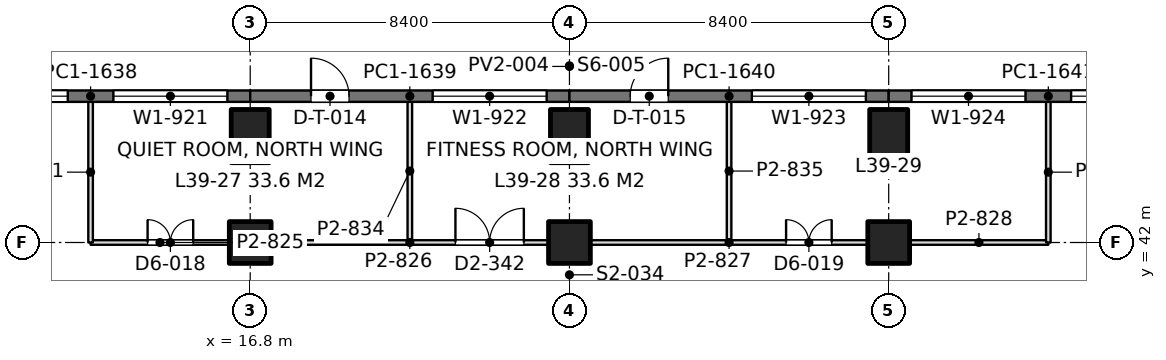
"""IFC4 building model, lengths in metres.
Left out: names, types, materials, properties, quantities, classifications, styles, units other than length and angle.
Written with IfcOpenShell. Run it as: python <this file> out.ifc"""

import sys

from ifc_helpers import new_model, si_unit, direction, frame, frame_2d, origin, origin_2d, place, context, subcontext, project, spatial, rectangle, extrude, element, fill, save


model = new_model("IFC4")
c1 = context("Model", 3, precision=1e-05, world=origin(), true_north=direction((0.0, 1.0)))
c2 = subcontext(c1, "Body", "Model", "MODEL_VIEW")
j1 = project(units=[si_unit("LENGTHUNIT", "METRE"), si_unit("PLANEANGLEUNIT", "RADIAN")], contexts=[c1])
p1 = place(None, origin())
s1 = spatial("IfcSite", under=j1, at=p1, CompositionType="ELEMENT")
p2 = place(p1, origin())
s2 = spatial("IfcBuilding", under=s1, at=p2, CompositionType="ELEMENT")
p3 = place(p2, frame((0.0, 0.0, 173.4)))
s3 = spatial("IfcBuildingStorey", under=s2, at=p3, CompositionType="ELEMENT", Elevation=173.4)
p4 = place(p3, frame((16.8, 42.0, 0.0), z_axis=(0.0, 0.0, 1.0), x_axis=(1.0, 0.0, 0.0)))
e1 = element("IfcColumn", 1, at=p4, inside=s3, PredefinedType="COLUMN", context=c2, shape_type="SweptSolid", body=[
    extrude(rectangle(XDim=1.1, YDim=1.1, at=origin_2d()), origin(), (0.0, 0.0, 1.0), 4.2),
])
p5 = place(p3, frame((16.8, 44.8, -0.36), z_axis=(0.0, 0.0, 1.0), x_axis=(1.0, 0.0, 0.0)))
e2 = element("IfcColumn", 2, at=p5, inside=s3, PredefinedType="COLUMN", context=c2, shape_type="SweptSolid", body=[
    extrude(rectangle(XDim=1.0, YDim=1.4, at=origin_2d()), origin(), (0.0, 0.0, 1.0), 4.56),
])
p6 = place(p3, frame((25.2, 42.0, 0.0), z_axis=(0.0, 0.0, 1.0), x_axis=(1.0, 0.0, 0.0)))
e3 = element("IfcColumn", 3, at=p6, inside=s3, PredefinedType="COLUMN", context=c2, shape_type="SweptSolid", body=[
    extrude(rectangle(XDim=1.1, YDim=1.1, at=origin_2d()), origin(), (0.0, 0.0, 1.0), 4.2),
])
p7 = place(p3, frame((25.2, 44.8, -0.36), z_axis=(0.0, 0.0, 1.0), x_axis=(1.0, 0.0, 0.0)))
e4 = element("IfcColumn", 4, at=p7, inside=s3, PredefinedType="COLUMN", context=c2, shape_type="SweptSolid", body=[
    extrude(rectangle(XDim=1.0, YDim=1.4, at=origin_2d()), origin(), (0.0, 0.0, 1.0), 4.56),
])
p8 = place(p3, frame((33.6, 42.0, 0.0), z_axis=(0.0, 0.0, 1.0), x_axis=(1.0, 0.0, 0.0)))
e5 = element("IfcColumn", 5, at=p8, inside=s3, PredefinedType="COLUMN", context=c2, shape_type="SweptSolid", body=[
    extrude(rectangle(XDim=1.1, YDim=1.1, at=origin_2d()), origin(), (0.0, 0.0, 1.0), 4.2),
])
p9 = place(p3, frame((33.6, 44.8, -0.36), z_axis=(0.0, 0.0, 1.0), x_axis=(1.0, 0.0, 0.0)))
e6 = element("IfcColumn", 6, at=p9, inside=s3, PredefinedType="COLUMN", context=c2, shape_type="SweptSolid", body=[
    extrude(rectangle(XDim=1.0, YDim=1.4, at=origin_2d()), origin(), (0.0, 0.0, 1.0), 4.56),
])
p10 = place(p3, frame((8.4, 45.85, 0.0), z_axis=(0.0, 0.0, 1.0), x_axis=(1.0, 0.0, 0.0)))
e7 = element("IfcWall", 7, at=p10, inside=s3, PredefinedType="SOLIDWALL", context=c2, shape_type="SweptSolid", body=[
    extrude(rectangle(XDim=8.4, YDim=0.3, at=frame_2d((4.2, 0.0))), origin(), (0.0, 0.0, 1.0), 4.05),
])
p11 = place(p10, frame((0.6, 0.0, 0.9)))
e8 = element("IfcOpeningElement", 8, at=p11, cuts=e7, PredefinedType="OPENING", context=c2, shape_type="SweptSolid", body=[
    extrude(rectangle(XDim=3.0, YDim=1.9, at=frame_2d((1.5, 0.95))), frame((0.0, 0.16, 0.0), z_axis=(0.0, -1.0, 0.0), x_axis=(1.0, 0.0, 0.0)), (0.0, 0.0, 1.0), 0.32),
])
p12 = place(p10, frame((4.8, 0.0, 0.9)))
e9 = element("IfcOpeningElement", 9, at=p12, cuts=e7, PredefinedType="OPENING", context=c2, shape_type="SweptSolid", body=[
    extrude(rectangle(XDim=3.0, YDim=1.9, at=frame_2d((1.5, 0.95))), frame((0.0, 0.16, 0.0), z_axis=(0.0, -1.0, 0.0), x_axis=(1.0, 0.0, 0.0)), (0.0, 0.0, 1.0), 0.32),
])
p13 = place(p3, frame((16.8, 45.85, 0.0), z_axis=(0.0, 0.0, 1.0), x_axis=(1.0, 0.0, 0.0)))
e10 = element("IfcWall", 10, at=p13, inside=s3, PredefinedType="SOLIDWALL", context=c2, shape_type="SweptSolid", body=[
    extrude(rectangle(XDim=8.4, YDim=0.3, at=frame_2d((4.2, 0.0))), origin(), (0.0, 0.0, 1.0), 4.05),
])
p14 = place(p13, frame((4.8, 0.0, 0.9)))
e11 = element("IfcOpeningElement", 11, at=p14, cuts=e10, PredefinedType="OPENING", context=c2, shape_type="SweptSolid", body=[
    extrude(rectangle(XDim=3.0, YDim=1.9, at=frame_2d((1.5, 0.95))), frame((0.0, 0.16, 0.0), z_axis=(0.0, -1.0, 0.0), x_axis=(1.0, 0.0, 0.0)), (0.0, 0.0, 1.0), 0.32),
])
p15 = place(p13, frame((1.6, 0.0, 0.0)))
e12 = element("IfcOpeningElement", 12, at=p15, cuts=e10, PredefinedType="OPENING", context=c2, shape_type="SweptSolid", body=[
    extrude(rectangle(XDim=1.0, YDim=2.4, at=frame_2d((0.5, 1.2))), frame((0.0, 0.16, 0.0), z_axis=(0.0, -1.0, 0.0), x_axis=(1.0, 0.0, 0.0)), (0.0, 0.0, 1.0), 0.32),
])
p16 = place(p3, frame((25.2, 45.85, 0.0), z_axis=(0.0, 0.0, 1.0), x_axis=(1.0, 0.0, 0.0)))
e13 = element("IfcWall", 13, at=p16, inside=s3, PredefinedType="SOLIDWALL", context=c2, shape_type="SweptSolid", body=[
    extrude(rectangle(XDim=8.4, YDim=0.3, at=frame_2d((4.2, 0.0))), origin(), (0.0, 0.0, 1.0), 4.05),
])
p17 = place(p16, frame((4.8, 0.0, 0.9)))
e14 = element("IfcOpeningElement", 14, at=p17, cuts=e13, PredefinedType="OPENING", context=c2, shape_type="SweptSolid", body=[
    extrude(rectangle(XDim=3.0, YDim=1.9, at=frame_2d((1.5, 0.95))), frame((0.0, 0.16, 0.0), z_axis=(0.0, -1.0, 0.0), x_axis=(1.0, 0.0, 0.0)), (0.0, 0.0, 1.0), 0.32),
])
p18 = place(p16, frame((1.6, 0.0, 0.0)))
e15 = element("IfcOpeningElement", 15, at=p18, cuts=e13, PredefinedType="OPENING", context=c2, shape_type="SweptSolid", body=[
    extrude(rectangle(XDim=1.0, YDim=2.4, at=frame_2d((0.5, 1.2))), frame((0.0, 0.16, 0.0), z_axis=(0.0, -1.0, 0.0), x_axis=(1.0, 0.0, 0.0)), (0.0, 0.0, 1.0), 0.32),
])
p19 = place(p3, frame((33.6, 45.85, 0.0), z_axis=(0.0, 0.0, 1.0), x_axis=(1.0, 0.0, 0.0)))
e16 = element("IfcWall", 16, at=p19, inside=s3, PredefinedType="SOLIDWALL", context=c2, shape_type="SweptSolid", body=[
    extrude(rectangle(XDim=8.4, YDim=0.3, at=frame_2d((4.2, 0.0))), origin(), (0.0, 0.0, 1.0), 4.05),
])
p20 = place(p19, frame((0.6, 0.0, 0.9)))
e17 = element("IfcOpeningElement", 17, at=p20, cuts=e16, PredefinedType="OPENING", context=c2, shape_type="SweptSolid", body=[
    extrude(rectangle(XDim=3.0, YDim=1.9, at=frame_2d((1.5, 0.95))), frame((0.0, 0.16, 0.0), z_axis=(0.0, -1.0, 0.0), x_axis=(1.0, 0.0, 0.0)), (0.0, 0.0, 1.0), 0.32),
])
p21 = place(p19, frame((4.8, 0.0, 0.9)))
e18 = element("IfcOpeningElement", 18, at=p21, cuts=e16, PredefinedType="OPENING", context=c2, shape_type="SweptSolid", body=[
    extrude(rectangle(XDim=3.0, YDim=1.9, at=frame_2d((1.5, 0.95))), frame((0.0, 0.16, 0.0), z_axis=(0.0, -1.0, 0.0), x_axis=(1.0, 0.0, 0.0)), (0.0, 0.0, 1.0), 0.32),
])
p22 = place(p3, frame((12.6, 42.0, 0.0), z_axis=(0.0, 0.0, 1.0), x_axis=(1.0, 0.0, 0.0)))
e19 = element("IfcWall", 19, at=p22, inside=s3, PredefinedType="PARTITIONING", context=c2, shape_type="SweptSolid", body=[
    extrude(rectangle(XDim=3.651, YDim=0.12, at=frame_2d((1.825, 0.0))), origin(), (0.0, 0.0, 1.0), 3.55),
])
p23 = place(p22, frame((1.5, 0.0, 0.0)))
e20 = element("IfcOpeningElement", 20, at=p23, cuts=e19, PredefinedType="OPENING", context=c2, shape_type="SweptSolid", body=[
    extrude(rectangle(XDim=1.2, YDim=2.2, at=frame_2d((0.6, 1.1))), frame((0.0, 0.07, 0.0), z_axis=(0.0, -1.0, 0.0), x_axis=(1.0, 0.0, 0.0)), (0.0, 0.0, 1.0), 0.14),
])
p24 = place(p3, frame((17.349, 42.0, 0.0), z_axis=(0.0, 0.0, 1.0), x_axis=(1.0, 0.0, 0.0)))
e21 = element("IfcWall", 21, at=p24, inside=s3, PredefinedType="PARTITIONING", context=c2, shape_type="SweptSolid", body=[
    extrude(rectangle(XDim=7.302, YDim=0.12, at=frame_2d((3.651, 0.0))), origin(), (0.0, 0.0, 1.0), 3.55),
])
p25 = place(p24, frame((4.851, 0.0, 0.0)))
e22 = element("IfcOpeningElement", 22, at=p25, cuts=e21, PredefinedType="OPENING", context=c2, shape_type="SweptSolid", body=[
    extrude(rectangle(XDim=1.8, YDim=2.2, at=frame_2d((0.9, 1.1))), frame((0.0, 0.07, 0.0), z_axis=(0.0, -1.0, 0.0), x_axis=(1.0, 0.0, 0.0)), (0.0, 0.0, 1.0), 0.14),
])
p26 = place(p3, frame((25.749, 42.0, 0.0), z_axis=(0.0, 0.0, 1.0), x_axis=(1.0, 0.0, 0.0)))
e23 = element("IfcWall", 23, at=p26, inside=s3, PredefinedType="PARTITIONING", context=c2, shape_type="SweptSolid", body=[
    extrude(rectangle(XDim=7.302, YDim=0.12, at=frame_2d((3.651, 0.0))), origin(), (0.0, 0.0, 1.0), 3.55),
])
p27 = place(p26, frame((5.151, 0.0, 0.0)))
e24 = element("IfcOpeningElement", 24, at=p27, cuts=e23, PredefinedType="OPENING", context=c2, shape_type="SweptSolid", body=[
    extrude(rectangle(XDim=1.2, YDim=2.2, at=frame_2d((0.6, 1.1))), frame((0.0, 0.07, 0.0), z_axis=(0.0, -1.0, 0.0), x_axis=(1.0, 0.0, 0.0)), (0.0, 0.0, 1.0), 0.14),
])
p28 = place(p3, frame((34.149, 42.0, 0.0), z_axis=(0.0, 0.0, 1.0), x_axis=(1.0, 0.0, 0.0)))
e25 = element("IfcWall", 25, at=p28, inside=s3, PredefinedType="PARTITIONING", context=c2, shape_type="SweptSolid", body=[
    extrude(rectangle(XDim=3.651, YDim=0.12, at=frame_2d((1.826, 0.0))), origin(), (0.0, 0.0, 1.0), 3.55),
])
p29 = place(p3, frame((12.6, 42.0, 0.0), z_axis=(0.0, 0.0, 1.0), x_axis=(0.0, 1.0, 0.0)))
e26 = element("IfcWall", 26, at=p29, inside=s3, PredefinedType="PARTITIONING", context=c2, shape_type="SweptSolid", body=[
    extrude(rectangle(XDim=3.702, YDim=0.12, at=frame_2d((1.851, 0.0))), origin(), (0.0, 0.0, 1.0), 3.55),
])
for number, where, z_axis, x_axis in (
    (27, (21.0, 42.058, 0.0), (0.0, 0.0, 1.0), (0.0, 1.0, 0.0)),
    (28, (29.4, 42.058, 0.0), (0.0, 0.0, 1.0), (0.0, 1.0, 0.0)),
):
    element("IfcWall", number, at=place(p3, frame(where, z_axis=z_axis, x_axis=x_axis)), inside=s3, PredefinedType="PARTITIONING", context=c2, shape_type="SweptSolid", body=[
        extrude(rectangle(XDim=3.644, YDim=0.12, at=frame_2d((1.822, 0.0))), origin(), (0.0, 0.0, 1.0), 3.55),
    ])
p30 = place(p3, frame((37.8, 42.0, 0.0), z_axis=(0.0, 0.0, 1.0), x_axis=(0.0, 1.0, 0.0)))
e29 = element("IfcWall", 29, at=p30, inside=s3, PredefinedType="PARTITIONING", context=c2, shape_type="SweptSolid", body=[
    extrude(rectangle(XDim=3.702, YDim=0.12, at=frame_2d((1.851, 0.0))), origin(), (0.0, 0.0, 1.0), 3.55),
])
p31 = place(p11, origin())
e30 = element("IfcWindow", 30, at=p31, inside=s3, PartitioningType="SINGLE_PANEL", PredefinedType="WINDOW", context=c2, shape_type="SweptSolid", body=[
    extrude(rectangle(XDim=3.0, YDim=1.9, at=frame_2d((1.5, 0.95))), frame((0.0, 0.03, 0.0), z_axis=(0.0, -1.0, 0.0), x_axis=(1.0, 0.0, 0.0)), (0.0, 0.0, 1.0), 0.06),
])
fill(e8, e30)
p32 = place(p12, origin())
e31 = element("IfcWindow", 31, at=p32, inside=s3, PartitioningType="SINGLE_PANEL", PredefinedType="WINDOW", context=c2, shape_type="SweptSolid", body=[
    extrude(rectangle(XDim=3.0, YDim=1.9, at=frame_2d((1.5, 0.95))), frame((0.0, 0.03, 0.0), z_axis=(0.0, -1.0, 0.0), x_axis=(1.0, 0.0, 0.0)), (0.0, 0.0, 1.0), 0.06),
])
fill(e9, e31)
p33 = place(p14, origin())
e32 = element("IfcWindow", 32, at=p33, inside=s3, PartitioningType="SINGLE_PANEL", PredefinedType="WINDOW", context=c2, shape_type="SweptSolid", body=[
    extrude(rectangle(XDim=3.0, YDim=1.9, at=frame_2d((1.5, 0.95))), frame((0.0, 0.03, 0.0), z_axis=(0.0, -1.0, 0.0), x_axis=(1.0, 0.0, 0.0)), (0.0, 0.0, 1.0), 0.06),
])
fill(e11, e32)
p34 = place(p15, origin())
e33 = element("IfcDoor", 33, at=p34, inside=s3, OperationType="SINGLE_SWING_LEFT", PredefinedType="DOOR", context=c2, shape_type="SweptSolid", body=[
    extrude(rectangle(XDim=1.0, YDim=2.4, at=frame_2d((0.5, 1.2))), frame((0.0, 0.025, 0.0), z_axis=(0.0, -1.0, 0.0), x_axis=(1.0, 0.0, 0.0)), (0.0, 0.0, 1.0), 0.05),
])
fill(e12, e33)
p35 = place(p17, origin())
e34 = element("IfcWindow", 34, at=p35, inside=s3, PartitioningType="SINGLE_PANEL", PredefinedType="WINDOW", context=c2, shape_type="SweptSolid", body=[
    extrude(rectangle(XDim=3.0, YDim=1.9, at=frame_2d((1.5, 0.95))), frame((0.0, 0.03, 0.0), z_axis=(0.0, -1.0, 0.0), x_axis=(1.0, 0.0, 0.0)), (0.0, 0.0, 1.0), 0.06),
])
fill(e14, e34)
p36 = place(p18, origin())
e35 = element("IfcDoor", 35, at=p36, inside=s3, OperationType="SINGLE_SWING_RIGHT", PredefinedType="DOOR", context=c2, shape_type="SweptSolid", body=[
    extrude(rectangle(XDim=1.0, YDim=2.4, at=frame_2d((0.5, 1.2))), frame((0.0, 0.025, 0.0), z_axis=(0.0, -1.0, 0.0), x_axis=(1.0, 0.0, 0.0)), (0.0, 0.0, 1.0), 0.05),
])
fill(e15, e35)
p37 = place(p20, origin())
e36 = element("IfcWindow", 36, at=p37, inside=s3, PartitioningType="SINGLE_PANEL", PredefinedType="WINDOW", context=c2, shape_type="SweptSolid", body=[
    extrude(rectangle(XDim=3.0, YDim=1.9, at=frame_2d((1.5, 0.95))), frame((0.0, 0.03, 0.0), z_axis=(0.0, -1.0, 0.0), x_axis=(1.0, 0.0, 0.0)), (0.0, 0.0, 1.0), 0.06),
])
fill(e17, e36)
p38 = place(p21, origin())
e37 = element("IfcWindow", 37, at=p38, inside=s3, PartitioningType="SINGLE_PANEL", PredefinedType="WINDOW", context=c2, shape_type="SweptSolid", body=[
    extrude(rectangle(XDim=3.0, YDim=1.9, at=frame_2d((1.5, 0.95))), frame((0.0, 0.03, 0.0), z_axis=(0.0, -1.0, 0.0), x_axis=(1.0, 0.0, 0.0)), (0.0, 0.0, 1.0), 0.06),
])
fill(e18, e37)
p39 = place(p23, origin())
e38 = element("IfcDoor", 38, at=p39, inside=s3, OperationType="DOUBLE_DOOR_SINGLE_SWING_OPPOSITE_LEFT", PredefinedType="DOOR", context=c2, shape_type="SweptSolid", body=[
    extrude(rectangle(XDim=1.2, YDim=2.2, at=frame_2d((0.6, 1.1))), frame((0.0, 0.025, 0.0), z_axis=(0.0, -1.0, 0.0), x_axis=(1.0, 0.0, 0.0)), (0.0, 0.0, 1.0), 0.05),
])
fill(e20, e38)
p40 = place(p25, origin())
e39 = element("IfcDoor", 39, at=p40, inside=s3, OperationType="DOUBLE_DOOR_SINGLE_SWING", PredefinedType="DOOR", context=c2, shape_type="SweptSolid", body=[
    extrude(rectangle(XDim=1.8, YDim=2.2, at=frame_2d((0.9, 1.1))), frame((0.0, 0.025, 0.0), z_axis=(0.0, -1.0, 0.0), x_axis=(1.0, 0.0, 0.0)), (0.0, 0.0, 1.0), 0.05),
])
fill(e22, e39)
p41 = place(p27, origin())
e40 = element("IfcDoor", 40, at=p41, inside=s3, OperationType="DOUBLE_DOOR_SINGLE_SWING_OPPOSITE_LEFT", PredefinedType="DOOR", context=c2, shape_type="SweptSolid", body=[
    extrude(rectangle(XDim=1.2, YDim=2.2, at=frame_2d((0.6, 1.1))), frame((0.0, 0.025, 0.0), z_axis=(0.0, -1.0, 0.0), x_axis=(1.0, 0.0, 0.0)), (0.0, 0.0, 1.0), 0.05),
])
fill(e24, e40)
save(model, sys.argv[1])
